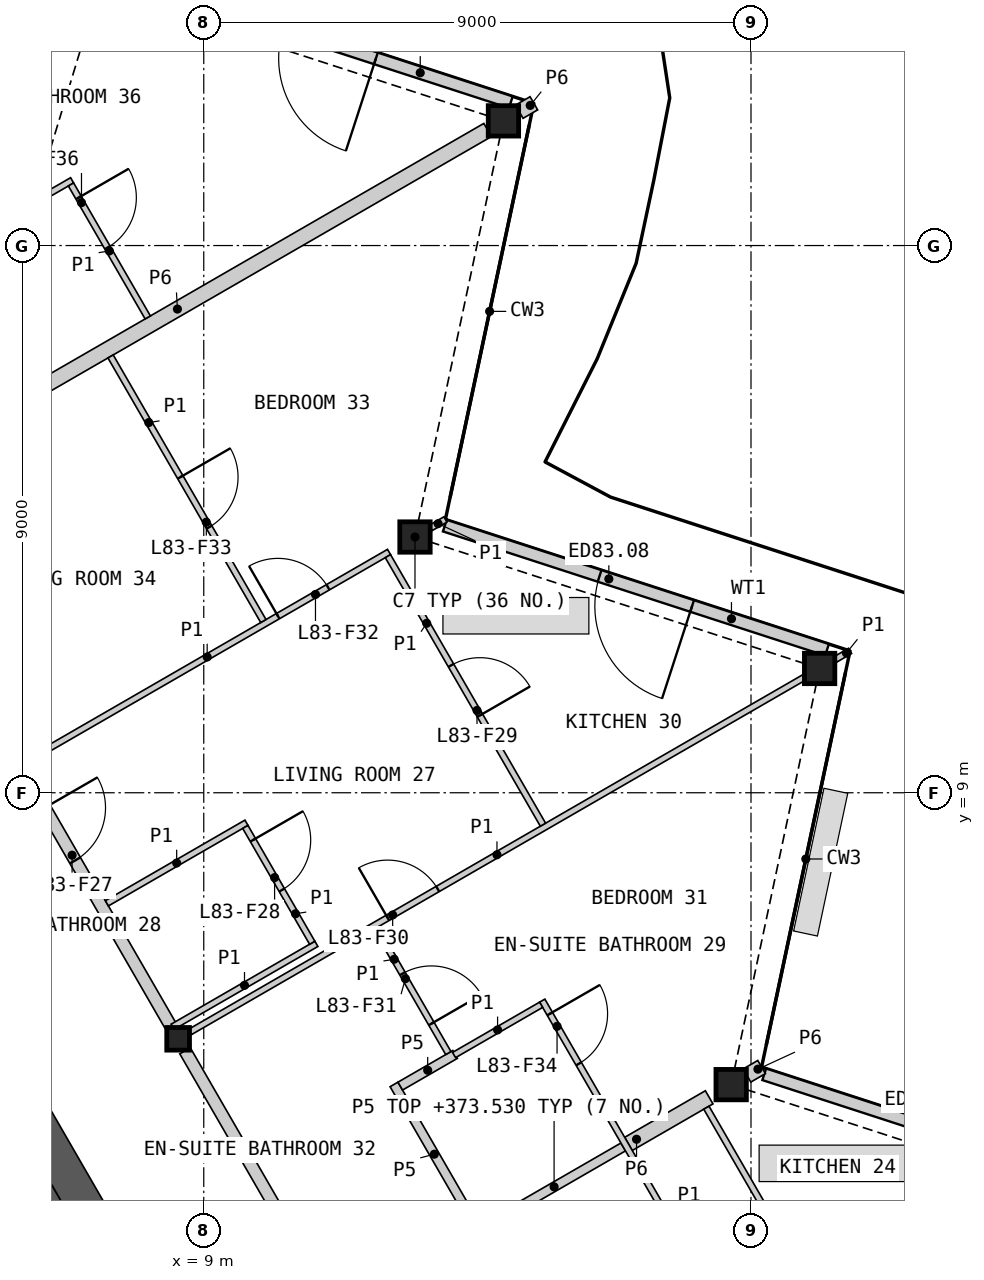
"""IFC4 building model, lengths in metres.
Left out: names, types, materials, properties, quantities, classifications, styles, units other than length and angle.
Written with IfcOpenShell. Run it as: python <this file> out.ifc"""

import sys

from ifc_helpers import new_model, si_unit, direction, frame, frame_2d, origin, origin_2d, place, context, subcontext, project, spatial, polyline, rectangle, hollow_rectangle, i_section, outline, extrude, element, fill, save


model = new_model("IFC4")
c1 = context("Model", 3, precision=1e-05, world=origin(), true_north=direction((0.0, 1.0)))
c2 = subcontext(c1, "Body", "Model", "MODEL_VIEW")
j1 = project(units=[si_unit("LENGTHUNIT", "METRE"), si_unit("PLANEANGLEUNIT", "RADIAN")], contexts=[c1])
p1 = place(None, origin())
s1 = spatial("IfcSite", under=j1, at=p1, CompositionType="ELEMENT")
p2 = place(p1, origin())
s2 = spatial("IfcBuilding", under=s1, at=p2, CompositionType="ELEMENT")
p3 = place(p2, frame((0.0, 0.0, 371.2)))
s3 = spatial("IfcBuildingStorey", under=s2, at=p3, CompositionType="ELEMENT", Elevation=371.2)
for number, where, z_axis, x_axis in (
    (1, (17.674, 4.199, 0.0), (0.0, 0.0, 1.0), (1.0, 0.0, 0.0)),
    (2, (19.129, 11.044, 0.0), (0.0, 0.0, 1.0), (1.0, 0.0, 0.0)),
    (3, (12.474, 13.206, 0.0), (0.0, 0.0, 1.0), (1.0, 0.0, 0.0)),
    (4, (13.929, 20.051, 0.0), (0.0, 0.0, 1.0), (1.0, 0.0, 0.0)),
):
    element("IfcColumn", number, at=place(p3, frame(where, z_axis=z_axis, x_axis=x_axis)), inside=s3, PredefinedType="COLUMN", context=c2, shape_type="SweptSolid", body=[
        extrude(hollow_rectangle(XDim=0.5, YDim=0.5, WallThickness=0.03, at=origin_2d()), origin(), (0.0, 0.0, 1.0), 3.4),
    ])
p4 = place(p3, frame((8.578, 4.953, 0.0), z_axis=(0.0, 0.0, 1.0), x_axis=(1.0, 0.0, 0.0)))
e5 = element("IfcColumn", 5, at=p4, inside=s3, PredefinedType="COLUMN", context=c2, shape_type="SweptSolid", body=[
    extrude(i_section(OverallWidth=0.374, OverallDepth=0.372, WebThickness=0.016, FlangeThickness=0.026, at=origin_2d()), origin(), (0.0, 0.0, 1.0), 3.4),
])
p5 = place(p3, frame((24.45, 2.344, 0.0), z_axis=(0.0, 0.0, 1.0), x_axis=(-0.951062538214, 0.308998460199, 0.0)))
e6 = element("IfcWall", 6, at=p5, inside=s3, PredefinedType="SOLIDWALL", context=c2, shape_type="SweptSolid", body=[
    extrude(rectangle(XDim=6.553, YDim=0.2, at=frame_2d((3.277, 0.0))), origin(), (0.0, 0.0, 1.0), 2.634),
])
p6 = place(p5, frame((2.333, 0.0, 0.0)))
e7 = element("IfcOpeningElement", 7, at=p6, cuts=e6, PredefinedType="OPENING", context=c2, shape_type="SweptSolid", body=[
    extrude(rectangle(XDim=1.6, YDim=2.25, at=frame_2d((0.8, 1.125))), frame((0.0, 0.11, 0.0), z_axis=(0.0, -1.0, 0.0), x_axis=(1.0, 0.0, 0.0)), (0.0, 0.0, 1.0), 0.22),
])
p7 = place(p3, frame((19.25, 11.351, 0.0), z_axis=(0.0, 0.0, 1.0), x_axis=(-0.951060668786, 0.309004214029, 0.0)))
e8 = element("IfcWall", 8, at=p7, inside=s3, PredefinedType="SOLIDWALL", context=c2, shape_type="SweptSolid", body=[
    extrude(rectangle(XDim=6.609, YDim=0.2, at=frame_2d((3.305, 0.0))), origin(), (0.0, 0.0, 1.0), 2.634),
])
p8 = place(p7, frame((2.333, 0.0, 0.0)))
e9 = element("IfcOpeningElement", 9, at=p8, cuts=e8, PredefinedType="OPENING", context=c2, shape_type="SweptSolid", body=[
    extrude(rectangle(XDim=1.6, YDim=2.25, at=frame_2d((0.8, 1.125))), frame((0.0, 0.11, 0.0), z_axis=(0.0, -1.0, 0.0), x_axis=(1.0, 0.0, 0.0)), (0.0, 0.0, 1.0), 0.22),
])
p9 = place(p3, frame((14.05, 20.357, 0.0), z_axis=(0.0, 0.0, 1.0), x_axis=(-0.951060123915, 0.309005891041, 0.0)))
e10 = element("IfcWall", 10, at=p9, inside=s3, PredefinedType="SOLIDWALL", context=c2, shape_type="SweptSolid", body=[
    extrude(rectangle(XDim=6.265, YDim=0.2, at=frame_2d((3.133, 0.0))), origin(), (0.0, 0.0, 1.0), 2.634),
])
p10 = place(p9, frame((2.333, 0.0, 0.0)))
e11 = element("IfcOpeningElement", 11, at=p10, cuts=e10, PredefinedType="OPENING", context=c2, shape_type="SweptSolid", body=[
    extrude(rectangle(XDim=1.6, YDim=2.25, at=frame_2d((0.8, 1.125))), frame((0.0, 0.11, 0.0), z_axis=(0.0, -1.0, 0.0), x_axis=(1.0, 0.0, 0.0)), (0.0, 0.0, 1.0), 0.22),
])
p11 = place(p3, origin())
e12 = element("IfcWall", 12, at=p11, inside=s3, PredefinedType="SHEAR", context=c2, shape_type="SweptSolid", body=[
    extrude(outline(polyline([(1.561, 6.097), (3.731, 7.35), (8.231, -0.444), (6.061, -1.697), (5.96, -1.524), (7.952, -0.374), (6.952, 1.358), (4.96, 0.208), (4.861, 0.381), (6.852, 1.531), (5.852, 3.263), (3.861, 2.113), (3.76, 2.287), (5.752, 3.437), (4.752, 5.169), (2.76, 4.019), (2.66, 4.192), (4.652, 5.342), (3.652, 7.074), (1.66, 5.924), (1.561, 6.097)])), origin(), (0.0, 0.0, 1.0), 3.1),
])
p12 = place(p3, frame((8.686, -0.634, 0.0), z_axis=(0.0, 0.0, 1.0), x_axis=(-0.500004601921, 0.866022746848, 0.0)))
e13 = element("IfcWall", 13, at=p12, inside=s3, PredefinedType="SHEAR", context=c2, shape_type="SweptSolid", body=[
    extrude(rectangle(XDim=16.853, YDim=0.6, at=frame_2d((8.426, 0.0))), origin(), (0.0, 0.0, 1.0), 3.1),
])
p13 = place(p3, frame((1.902, 16.302, 0.0), z_axis=(0.0, 0.0, 1.0), x_axis=(0.491233789602, 0.871027763021, 0.0)))
e14 = element("IfcWall", 14, at=p13, inside=s3, PredefinedType="PARTITIONING", context=c2, shape_type="SweptSolid", body=[
    extrude(rectangle(XDim=14.345, YDim=0.25, at=frame_2d((7.173, 0.0))), origin(), (0.0, 0.0, 1.0), 2.33),
])
p14 = place(p3, frame((3.465, 14.01, 0.0), z_axis=(0.0, 0.0, 1.0), x_axis=(0.866032376801, 0.499987922186, 0.0)))
e15 = element("IfcWall", 15, at=p14, inside=s3, PredefinedType="PARTITIONING", context=c2, shape_type="SweptSolid", body=[
    extrude(rectangle(XDim=11.782, YDim=0.25, at=frame_2d((5.891, 0.0))), origin(), (0.0, 0.0, 1.0), 2.33),
])
p15 = place(p3, frame((4.403, 12.185, 0.0), z_axis=(0.0, 0.0, 1.0), x_axis=(0.499992155518, -0.866029932751, 0.0)))
e16 = element("IfcWall", 16, at=p15, inside=s3, PredefinedType="PARTITIONING", context=c2, shape_type="SweptSolid", body=[
    extrude(rectangle(XDim=8.123, YDim=0.2, at=frame_2d((4.062, 0.0))), origin(), (0.0, 0.0, 1.0), 3.1),
])
p16 = place(p15, frame((3.963, 0.0, 0.0)))
e17 = element("IfcOpeningElement", 17, at=p16, cuts=e16, PredefinedType="OPENING", context=c2, shape_type="SweptSolid", body=[
    extrude(rectangle(XDim=1.0, YDim=2.1, at=frame_2d((0.5, 1.05))), frame((0.0, 0.11, 0.0), z_axis=(0.0, -1.0, 0.0), x_axis=(1.0, 0.0, 0.0)), (0.0, 0.0, 1.0), 0.22),
])
p17 = place(p3, frame((8.692, 4.756, 0.0), z_axis=(0.0, 0.0, 1.0), x_axis=(0.500001682468, -0.866024432409, 0.0)))
e18 = element("IfcWall", 18, at=p17, inside=s3, PredefinedType="PARTITIONING", context=c2, shape_type="SweptSolid", body=[
    extrude(rectangle(XDim=8.124, YDim=0.2, at=frame_2d((4.062, 0.0))), origin(), (0.0, 0.0, 1.0), 3.1),
])
p18 = place(p17, frame((5.97, 0.0, 0.0)))
e19 = element("IfcOpeningElement", 19, at=p18, cuts=e18, PredefinedType="OPENING", context=c2, shape_type="SweptSolid", body=[
    extrude(rectangle(XDim=1.0, YDim=2.1, at=frame_2d((0.5, 1.05))), frame((0.0, 0.11, 0.0), z_axis=(0.0, -1.0, 0.0), x_axis=(1.0, 0.0, 0.0)), (0.0, 0.0, 1.0), 0.22),
])
p19 = place(p3, frame((15.985, 3.224, 0.0), z_axis=(0.0, 0.0, 1.0), x_axis=(0.865989259495, 0.50006259852, 0.0)))
e20 = element("IfcWall", 20, at=p19, inside=s3, PredefinedType="PARTITIONING", context=c2, shape_type="SweptSolid", body=[
    extrude(rectangle(XDim=1.532, YDim=0.25, at=frame_2d((0.766, 0.0))), origin(), (0.0, 0.0, 1.0), 2.33),
])
for number, where, z_axis, x_axis in (
    (21, (14.189, 20.201, 0.0), (0.0, 0.0, 1.0), (0.866, 0.501, 0.0)),
    (22, (17.934, 4.35, 0.0), (0.0, 0.0, 1.0), (0.866, 0.5, 0.0)),
):
    element("IfcWall", number, at=place(p3, frame(where, z_axis=z_axis, x_axis=x_axis)), inside=s3, PredefinedType="PARTITIONING", context=c2, shape_type="SweptSolid", body=[
        extrude(rectangle(XDim=0.278, YDim=0.25, at=frame_2d((0.139, 0.0))), origin(), (0.0, 0.0, 1.0), 2.33),
    ])
p20 = place(p3, frame((13.625, 1.862, 0.0), z_axis=(0.0, 0.0, 1.0), x_axis=(0.866013657776, 0.500020344131, 0.0)))
e23 = element("IfcWall", 23, at=p20, inside=s3, PredefinedType="PLUMBINGWALL", context=c2, shape_type="SweptSolid", body=[
    extrude(rectangle(XDim=2.625, YDim=0.15, at=frame_2d((1.312, 0.0))), origin(), (0.0, 0.0, 1.0), 2.33),
])
p21 = place(p3, frame((12.129, 4.203, 0.0), z_axis=(0.0, 0.0, 1.0), x_axis=(0.499993606316, -0.866029095148, 0.0)))
e24 = element("IfcWall", 24, at=p21, inside=s3, PredefinedType="PLUMBINGWALL", context=c2, shape_type="SweptSolid", body=[
    extrude(rectangle(XDim=2.65, YDim=0.15, at=frame_2d((1.325, 0.0))), origin(), (0.0, 0.0, 1.0), 2.33),
])
p22 = place(p3, frame((12.232, 4.175, 0.0), z_axis=(0.0, 0.0, 1.0), x_axis=(0.866056787991, 0.499945637019, 0.0)))
e25 = element("IfcWall", 25, at=p22, inside=s3, PredefinedType="PLUMBINGWALL", context=c2, shape_type="SweptSolid", body=[
    extrude(rectangle(XDim=1.042, YDim=0.15, at=frame_2d((0.521, 0.0))), origin(), (0.0, 0.0, 1.0), 2.33),
])
p23 = place(p3, frame((8.775, 5.066, 0.0), z_axis=(0.0, 0.0, 1.0), x_axis=(0.866023724155, 0.500002909193, 0.0)))
e26 = element("IfcWall", 26, at=p23, inside=s3, PredefinedType="PARTITIONING", context=c2, shape_type="SweptSolid", body=[
    extrude(rectangle(XDim=11.655, YDim=0.1, at=frame_2d((5.827, 0.0))), origin(), (0.0, 0.0, 1.0), 2.33),
])
p24 = place(p23, frame((3.751, 0.0, 0.0)))
e27 = element("IfcOpeningElement", 27, at=p24, cuts=e26, PredefinedType="OPENING", context=c2, shape_type="SweptSolid", body=[
    extrude(rectangle(XDim=0.95, YDim=2.1, at=frame_2d((0.475, 1.05))), frame((0.0, 0.06, 0.0), z_axis=(0.0, -1.0, 0.0), x_axis=(1.0, 0.0, 0.0)), (0.0, 0.0, 1.0), 0.12),
])
p25 = place(p3, frame((6.065, 9.506, 0.0), z_axis=(0.0, 0.0, 1.0), x_axis=(0.866029020252, 0.499993736042, 0.0)))
e28 = element("IfcWall", 28, at=p25, inside=s3, PredefinedType="PARTITIONING", context=c2, shape_type="SweptSolid", body=[
    extrude(rectangle(XDim=6.907, YDim=0.1, at=frame_2d((3.454, 0.0))), origin(), (0.0, 0.0, 1.0), 2.33),
])
p26 = place(p25, frame((4.798, 0.0, 0.0)))
e29 = element("IfcOpeningElement", 29, at=p26, cuts=e28, PredefinedType="OPENING", context=c2, shape_type="SweptSolid", body=[
    extrude(rectangle(XDim=0.95, YDim=2.1, at=frame_2d((0.475, 1.05))), frame((0.0, 0.06, 0.0), z_axis=(0.0, -1.0, 0.0), x_axis=(1.0, 0.0, 0.0)), (0.0, 0.0, 1.0), 0.12),
])
p27 = place(p3, frame((14.567, 5.581, 0.0), z_axis=(0.0, 0.0, 1.0), x_axis=(0.499996545922, -0.866027397988, 0.0)))
e30 = element("IfcWall", 30, at=p27, inside=s3, PredefinedType="PARTITIONING", context=c2, shape_type="SweptSolid", body=[
    extrude(rectangle(XDim=5.5, YDim=0.1, at=frame_2d((2.75, 0.0))), origin(), (0.0, 0.0, 1.0), 2.33),
])
p28 = place(p27, frame((0.25, 0.0, 0.0)))
e31 = element("IfcOpeningElement", 31, at=p28, cuts=e30, PredefinedType="OPENING", context=c2, shape_type="SweptSolid", body=[
    extrude(rectangle(XDim=0.95, YDim=2.1, at=frame_2d((0.475, 1.05))), frame((0.0, 0.06, 0.0), z_axis=(0.0, -1.0, 0.0), x_axis=(1.0, 0.0, 0.0)), (0.0, 0.0, 1.0), 0.12),
])
p29 = place(p3, frame((7.468, 16.176, 0.0), z_axis=(0.0, 0.0, 1.0), x_axis=(0.499990214365, -0.86603105345, 0.0)))
e32 = element("IfcWall", 32, at=p29, inside=s3, PredefinedType="PARTITIONING", context=c2, shape_type="SweptSolid", body=[
    extrude(rectangle(XDim=5.025, YDim=0.1, at=frame_2d((2.512, 0.0))), origin(), (0.0, 0.0, 1.0), 2.33),
])
p30 = place(p29, frame((2.293, 0.0, 0.0)))
e33 = element("IfcOpeningElement", 33, at=p30, cuts=e32, PredefinedType="OPENING", context=c2, shape_type="SweptSolid", body=[
    extrude(rectangle(XDim=0.95, YDim=2.1, at=frame_2d((0.475, 1.05))), frame((0.0, 0.06, 0.0), z_axis=(0.0, -1.0, 0.0), x_axis=(1.0, 0.0, 0.0)), (0.0, 0.0, 1.0), 0.12),
])
p31 = place(p3, frame((12.029, 12.892, 0.0), z_axis=(0.0, 0.0, 1.0), x_axis=(0.500005610874, -0.86602216432, 0.0)))
e34 = element("IfcWall", 34, at=p31, inside=s3, PredefinedType="PARTITIONING", context=c2, shape_type="SweptSolid", body=[
    extrude(rectangle(XDim=5.1, YDim=0.1, at=frame_2d((2.55, 0.0))), origin(), (0.0, 0.0, 1.0), 2.33),
])
p32 = place(p31, frame((2.075, 0.0, 0.0)))
e35 = element("IfcOpeningElement", 35, at=p32, cuts=e34, PredefinedType="OPENING", context=c2, shape_type="SweptSolid", body=[
    extrude(rectangle(XDim=0.95, YDim=2.1, at=frame_2d((0.475, 1.05))), frame((0.0, 0.06, 0.0), z_axis=(0.0, -1.0, 0.0), x_axis=(1.0, 0.0, 0.0)), (0.0, 0.0, 1.0), 0.12),
])
p33 = place(p3, frame((17.266, 3.82, 0.0), z_axis=(0.0, 0.0, 1.0), x_axis=(0.499990214365, -0.86603105345, 0.0)))
e36 = element("IfcWall", 36, at=p33, inside=s3, PredefinedType="PARTITIONING", context=c2, shape_type="SweptSolid", body=[
    extrude(rectangle(XDim=5.025, YDim=0.1, at=frame_2d((2.512, 0.0))), origin(), (0.0, 0.0, 1.0), 2.33),
])
p34 = place(p33, frame((3.008, 0.0, 0.0)))
e37 = element("IfcOpeningElement", 37, at=p34, cuts=e36, PredefinedType="OPENING", context=c2, shape_type="SweptSolid", body=[
    extrude(rectangle(XDim=0.95, YDim=2.1, at=frame_2d((0.475, 1.05))), frame((0.0, 0.06, 0.0), z_axis=(0.0, -1.0, 0.0), x_axis=(1.0, 0.0, 0.0)), (0.0, 0.0, 1.0), 0.12),
])
p35 = place(p3, frame((4.323, 17.623, 0.0), z_axis=(0.0, 0.0, 1.0), x_axis=(0.866032775405, 0.499987231761, 0.0)))
e38 = element("IfcWall", 38, at=p35, inside=s3, PredefinedType="PARTITIONING", context=c2, shape_type="SweptSolid", body=[
    extrude(rectangle(XDim=2.9, YDim=0.1, at=frame_2d((1.45, 0.0))), origin(), (0.0, 0.0, 1.0), 2.33),
])
p36 = place(p3, frame((7.407, 7.182, 0.0), z_axis=(0.0, 0.0, 1.0), x_axis=(0.866052124492, 0.499953715521, 0.0)))
e39 = element("IfcWall", 39, at=p36, inside=s3, PredefinedType="PARTITIONING", context=c2, shape_type="SweptSolid", body=[
    extrude(rectangle(XDim=2.65, YDim=0.1, at=frame_2d((1.325, 0.0))), origin(), (0.0, 0.0, 1.0), 2.33),
])
p37 = place(p3, frame((6.817, 19.004, 0.0), z_axis=(0.0, 0.0, 1.0), x_axis=(0.499976333282, -0.866039067339, 0.0)))
e40 = element("IfcWall", 40, at=p37, inside=s3, PredefinedType="PARTITIONING", context=c2, shape_type="SweptSolid", body=[
    extrude(rectangle(XDim=2.525, YDim=0.1, at=frame_2d((1.262, 0.0))), origin(), (0.0, 0.0, 1.0), 2.33),
])
p38 = place(p37, frame((0.25, 0.0, 0.0)))
e41 = element("IfcOpeningElement", 41, at=p38, cuts=e40, PredefinedType="OPENING", context=c2, shape_type="SweptSolid", body=[
    extrude(rectangle(XDim=0.95, YDim=2.1, at=frame_2d((0.475, 1.05))), frame((0.0, 0.06, 0.0), z_axis=(0.0, -1.0, 0.0), x_axis=(1.0, 0.0, 0.0)), (0.0, 0.0, 1.0), 0.12),
])
p39 = place(p3, frame((8.488, 5.15, 0.0), z_axis=(0.0, 0.0, 1.0), x_axis=(0.866027727466, 0.499995975244, 0.0)))
e42 = element("IfcWall", 42, at=p39, inside=s3, PredefinedType="PARTITIONING", context=c2, shape_type="SweptSolid", body=[
    extrude(rectangle(XDim=2.73, YDim=0.1, at=frame_2d((1.365, 0.0))), origin(), (0.0, 0.0, 1.0), 2.33),
])
p40 = place(p3, frame((11.835, 6.775, 0.0), z_axis=(0.0, 0.0, 1.0), x_axis=(0.500030943131, -0.866007538022, 0.0)))
e43 = element("IfcWall", 43, at=p40, inside=s3, PredefinedType="PARTITIONING", context=c2, shape_type="SweptSolid", body=[
    extrude(rectangle(XDim=2.375, YDim=0.1, at=frame_2d((1.188, 0.0))), origin(), (0.0, 0.0, 1.0), 2.33),
])
p41 = place(p40, frame((0.867, 0.0, 0.0)))
e44 = element("IfcOpeningElement", 44, at=p41, cuts=e43, PredefinedType="OPENING", context=c2, shape_type="SweptSolid", body=[
    extrude(rectangle(XDim=0.95, YDim=2.1, at=frame_2d((0.475, 1.05))), frame((0.0, 0.06, 0.0), z_axis=(0.0, -1.0, 0.0), x_axis=(1.0, 0.0, 0.0)), (0.0, 0.0, 1.0), 0.12),
])
p42 = place(p3, frame((9.684, 8.438, 0.0), z_axis=(0.0, 0.0, 1.0), x_axis=(0.499994660107, -0.866028486751, 0.0)))
e45 = element("IfcWall", 45, at=p42, inside=s3, PredefinedType="PARTITIONING", context=c2, shape_type="SweptSolid", body=[
    extrude(rectangle(XDim=2.2, YDim=0.1, at=frame_2d((1.1, 0.0))), origin(), (0.0, 0.0, 1.0), 2.33),
])
p43 = place(p42, frame((0.25, 0.0, 0.0)))
e46 = element("IfcOpeningElement", 46, at=p43, cuts=e45, PredefinedType="OPENING", context=c2, shape_type="SweptSolid", body=[
    extrude(rectangle(XDim=0.95, YDim=2.1, at=frame_2d((0.475, 1.05))), frame((0.0, 0.06, 0.0), z_axis=(0.0, -1.0, 0.0), x_axis=(1.0, 0.0, 0.0)), (0.0, 0.0, 1.0), 0.12),
])
p44 = place(p3, frame((13.116, 4.686, 0.0), z_axis=(0.0, 0.0, 1.0), x_axis=(0.866072496716, 0.499918423778, 0.0)))
e47 = element("IfcWall", 47, at=p44, inside=s3, PredefinedType="PARTITIONING", context=c2, shape_type="SweptSolid", body=[
    extrude(rectangle(XDim=1.654, YDim=0.1, at=frame_2d((0.827, 0.0))), origin(), (0.0, 0.0, 1.0), 2.33),
])
p45 = place(p3, frame((12.734, 13.356, 0.0), z_axis=(0.0, 0.0, 1.0), x_axis=(0.865687176694, 0.50058536945, 0.0)))
e48 = element("IfcWall", 48, at=p45, inside=s3, PredefinedType="PARTITIONING", context=c2, shape_type="SweptSolid", body=[
    extrude(rectangle(XDim=0.278, YDim=0.1, at=frame_2d((0.139, 0.0))), origin(), (0.0, 0.0, 1.0), 2.33),
])
p46 = place(p3, frame((19.389, 11.194, 0.0), z_axis=(0.0, 0.0, 1.0), x_axis=(0.866068339032, 0.499925626596, 0.0)))
e49 = element("IfcWall", 49, at=p46, inside=s3, PredefinedType="PARTITIONING", context=c2, shape_type="SweptSolid", body=[
    extrude(rectangle(XDim=0.277, YDim=0.1, at=frame_2d((0.139, 0.0))), origin(), (0.0, 0.0, 1.0), 2.33),
])
p47 = place(p8, origin())
e50 = element("IfcDoor", 50, at=p47, inside=s3, OperationType="DOUBLE_DOOR_SINGLE_SWING", PredefinedType="DOOR", context=c2, shape_type="SweptSolid", body=[
    extrude(rectangle(XDim=1.6, YDim=2.25, at=frame_2d((0.8, 1.125))), frame((0.0, 0.025, 0.0), z_axis=(0.0, -1.0, 0.0), x_axis=(1.0, 0.0, 0.0)), (0.0, 0.0, 1.0), 0.05),
])
fill(e9, e50)
p48 = place(p10, origin())
e51 = element("IfcDoor", 51, at=p48, inside=s3, OperationType="DOUBLE_DOOR_SINGLE_SWING", PredefinedType="DOOR", context=c2, shape_type="SweptSolid", body=[
    extrude(rectangle(XDim=1.6, YDim=2.25, at=frame_2d((0.8, 1.125))), frame((0.0, 0.025, 0.0), z_axis=(0.0, -1.0, 0.0), x_axis=(1.0, 0.0, 0.0)), (0.0, 0.0, 1.0), 0.05),
])
fill(e11, e51)
p49 = place(p16, origin())
e52 = element("IfcDoor", 52, at=p49, inside=s3, OperationType="SINGLE_SWING_LEFT", PredefinedType="DOOR", context=c2, shape_type="SweptSolid", body=[
    extrude(rectangle(XDim=1.0, YDim=2.1, at=frame_2d((0.5, 1.05))), frame((0.0, 0.025, 0.0), z_axis=(0.0, -1.0, 0.0), x_axis=(1.0, 0.0, 0.0)), (0.0, 0.0, 1.0), 0.05),
])
fill(e17, e52)
p50 = place(p43, origin())
e53 = element("IfcDoor", 53, at=p50, inside=s3, OperationType="SINGLE_SWING_LEFT", PredefinedType="DOOR", context=c2, shape_type="SweptSolid", body=[
    extrude(rectangle(XDim=0.95, YDim=2.1, at=frame_2d((0.475, 1.05))), frame((0.0, 0.025, 0.0), z_axis=(0.0, -1.0, 0.0), x_axis=(1.0, 0.0, 0.0)), (0.0, 0.0, 1.0), 0.05),
])
fill(e46, e53)
p51 = place(p32, origin())
e54 = element("IfcDoor", 54, at=p51, inside=s3, OperationType="SINGLE_SWING_RIGHT", PredefinedType="DOOR", context=c2, shape_type="SweptSolid", body=[
    extrude(rectangle(XDim=0.95, YDim=2.1, at=frame_2d((0.475, 1.05))), frame((0.0, 0.025, 0.0), z_axis=(0.0, -1.0, 0.0), x_axis=(1.0, 0.0, 0.0)), (0.0, 0.0, 1.0), 0.05),
])
fill(e35, e54)
p52 = place(p24, origin())
e55 = element("IfcDoor", 55, at=p52, inside=s3, OperationType="SINGLE_SWING_LEFT", PredefinedType="DOOR", context=c2, shape_type="SweptSolid", body=[
    extrude(rectangle(XDim=0.95, YDim=2.1, at=frame_2d((0.475, 1.05))), frame((0.0, 0.025, 0.0), z_axis=(0.0, -1.0, 0.0), x_axis=(1.0, 0.0, 0.0)), (0.0, 0.0, 1.0), 0.05),
])
fill(e27, e55)
p53 = place(p41, origin())
e56 = element("IfcDoor", 56, at=p53, inside=s3, OperationType="SINGLE_SWING_RIGHT", PredefinedType="DOOR", context=c2, shape_type="SweptSolid", body=[
    extrude(rectangle(XDim=0.95, YDim=2.1, at=frame_2d((0.475, 1.05))), frame((0.0, 0.025, 0.0), z_axis=(0.0, -1.0, 0.0), x_axis=(1.0, 0.0, 0.0)), (0.0, 0.0, 1.0), 0.05),
])
fill(e44, e56)
p54 = place(p26, origin())
e57 = element("IfcDoor", 57, at=p54, inside=s3, OperationType="SINGLE_SWING_LEFT", PredefinedType="DOOR", context=c2, shape_type="SweptSolid", body=[
    extrude(rectangle(XDim=0.95, YDim=2.1, at=frame_2d((0.475, 1.05))), frame((0.0, 0.025, 0.0), z_axis=(0.0, -1.0, 0.0), x_axis=(1.0, 0.0, 0.0)), (0.0, 0.0, 1.0), 0.05),
])
fill(e29, e57)
p55 = place(p30, origin())
e58 = element("IfcDoor", 58, at=p55, inside=s3, OperationType="SINGLE_SWING_LEFT", PredefinedType="DOOR", context=c2, shape_type="SweptSolid", body=[
    extrude(rectangle(XDim=0.95, YDim=2.1, at=frame_2d((0.475, 1.05))), frame((0.0, 0.025, 0.0), z_axis=(0.0, -1.0, 0.0), x_axis=(1.0, 0.0, 0.0)), (0.0, 0.0, 1.0), 0.05),
])
fill(e33, e58)
p56 = place(p28, origin())
e59 = element("IfcDoor", 59, at=p56, inside=s3, OperationType="SINGLE_SWING_LEFT", PredefinedType="DOOR", context=c2, shape_type="SweptSolid", body=[
    extrude(rectangle(XDim=0.95, YDim=2.1, at=frame_2d((0.475, 1.05))), frame((0.0, 0.025, 0.0), z_axis=(0.0, -1.0, 0.0), x_axis=(1.0, 0.0, 0.0)), (0.0, 0.0, 1.0), 0.05),
])
fill(e31, e59)
p57 = place(p38, origin())
e60 = element("IfcDoor", 60, at=p57, inside=s3, OperationType="SINGLE_SWING_LEFT", PredefinedType="DOOR", context=c2, shape_type="SweptSolid", body=[
    extrude(rectangle(XDim=0.95, YDim=2.1, at=frame_2d((0.475, 1.05))), frame((0.0, 0.025, 0.0), z_axis=(0.0, -1.0, 0.0), x_axis=(1.0, 0.0, 0.0)), (0.0, 0.0, 1.0), 0.05),
])
fill(e41, e60)
save(model, sys.argv[1])
